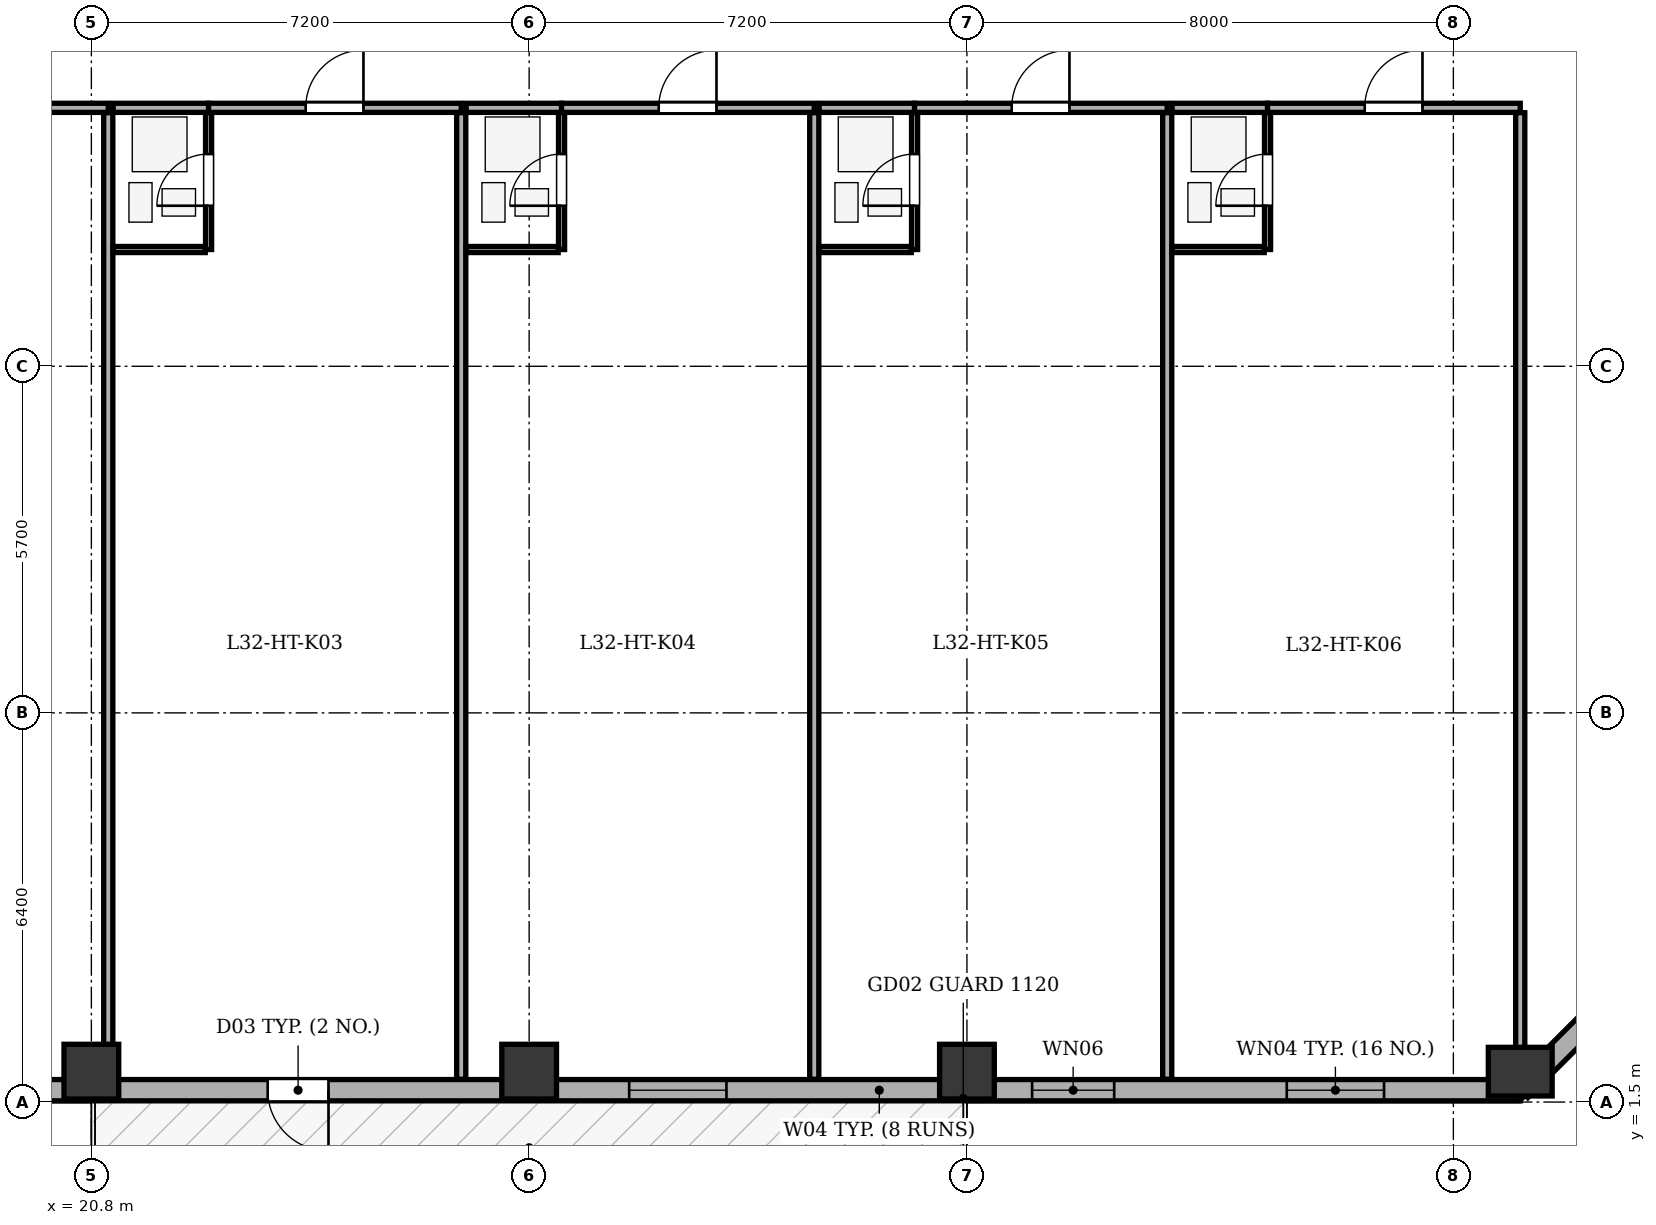
"""IFC4 building model, lengths in metres.
Left out: names, types, materials, properties, quantities, classifications, styles, units other than length and angle.
Written with IfcOpenShell. Run it as: python <this file> out.ifc"""

import sys

from ifc_helpers import new_model, si_unit, direction, frame, frame_2d, origin, origin_2d, place, context, subcontext, project, spatial, rectangle, extrude, element, fill, save


model = new_model("IFC4")
c1 = context("Model", 3, precision=1e-05, world=origin(), true_north=direction((0.0, 1.0)))
c2 = subcontext(c1, "Body", "Model", "MODEL_VIEW")
j1 = project(units=[si_unit("LENGTHUNIT", "METRE"), si_unit("PLANEANGLEUNIT", "RADIAN")], contexts=[c1])
p1 = place(None, origin())
s1 = spatial("IfcSite", under=j1, at=p1, CompositionType="ELEMENT")
p2 = place(p1, origin())
s2 = spatial("IfcBuilding", under=s1, at=p2, CompositionType="ELEMENT")
p3 = place(p2, frame((0.0, 0.0, 130.8)))
s3 = spatial("IfcBuildingStorey", under=s2, at=p3, CompositionType="ELEMENT", Elevation=130.8)
for number, where, z_axis, x_axis in (
    (1, (20.8, 2.0, 0.0), (0.0, 0.0, 1.0), (1.0, 0.0, 0.0)),
    (2, (28.0, 2.0, 0.0), (0.0, 0.0, 1.0), (1.0, 0.0, 0.0)),
    (3, (35.2, 2.0, 0.0), (0.0, 0.0, 1.0), (1.0, 0.0, 0.0)),
):
    element("IfcColumn", number, at=place(p3, frame(where, z_axis=z_axis, x_axis=x_axis)), inside=s3, PredefinedType="COLUMN", context=c2, shape_type="SweptSolid", body=[
        extrude(rectangle(XDim=0.9, YDim=0.9, at=origin_2d()), origin(), (0.0, 0.0, 1.0), 3.5),
    ])
p4 = place(p3, frame((44.3, 2.0, 0.0), z_axis=(0.0, 0.0, 1.0), x_axis=(1.0, 0.0, 0.0)))
e4 = element("IfcColumn", 4, at=p4, inside=s3, PredefinedType="COLUMN", context=c2, shape_type="SweptSolid", body=[
    extrude(rectangle(XDim=0.8, YDim=1.05, at=origin_2d()), origin(), (0.0, 0.0, 1.0), 3.5),
])
p5 = place(p3, frame((44.3, 1.695, 0.0), z_axis=(0.0, 0.0, 1.0), x_axis=(-1.0, 0.0, 0.0)))
e5 = element("IfcWall", 5, at=p5, inside=s3, PredefinedType="STANDARD", context=c2, shape_type="SweptSolid", body=[
    extrude(rectangle(XDim=35.0, YDim=0.35, at=frame_2d((17.5, 0.0))), origin(), (0.0, 0.0, 1.0), 2.785),
])
p6 = place(p5, frame((19.6, 0.0, 0.0)))
e6 = element("IfcOpeningElement", 6, at=p6, cuts=e5, PredefinedType="OPENING", context=c2, shape_type="SweptSolid", body=[
    extrude(rectangle(XDim=1.0, YDim=2.02, at=frame_2d((0.5, 1.01))), frame((0.0, 0.185, 0.0), z_axis=(0.0, -1.0, 0.0), x_axis=(1.0, 0.0, 0.0)), (0.0, 0.0, 1.0), 0.37),
])
p7 = place(p5, frame((2.24, 0.0, 0.75)))
e7 = element("IfcOpeningElement", 7, at=p7, cuts=e5, PredefinedType="OPENING", context=c2, shape_type="SweptSolid", body=[
    extrude(rectangle(XDim=1.6, YDim=1.75, at=frame_2d((0.8, 0.875))), frame((0.0, 0.185, 0.0), z_axis=(0.0, -1.0, 0.0), x_axis=(1.0, 0.0, 0.0)), (0.0, 0.0, 1.0), 0.37),
])
p8 = place(p5, frame((6.678, 0.0, 0.75)))
e8 = element("IfcOpeningElement", 8, at=p8, cuts=e5, PredefinedType="OPENING", context=c2, shape_type="SweptSolid", body=[
    extrude(rectangle(XDim=1.35, YDim=1.75, at=frame_2d((0.675, 0.875))), frame((0.0, 0.185, 0.0), z_axis=(0.0, -1.0, 0.0), x_axis=(1.0, 0.0, 0.0)), (0.0, 0.0, 1.0), 0.37),
])
p9 = place(p5, frame((13.055, 0.0, 0.75)))
e9 = element("IfcOpeningElement", 9, at=p9, cuts=e5, PredefinedType="OPENING", context=c2, shape_type="SweptSolid", body=[
    extrude(rectangle(XDim=1.6, YDim=1.75, at=frame_2d((0.8, 0.875))), frame((0.0, 0.185, 0.0), z_axis=(0.0, -1.0, 0.0), x_axis=(1.0, 0.0, 0.0)), (0.0, 0.0, 1.0), 0.37),
])
p10 = place(p5, frame((25.393, 0.0, 0.75)))
e10 = element("IfcOpeningElement", 10, at=p10, cuts=e5, PredefinedType="OPENING", context=c2, shape_type="SweptSolid", body=[
    extrude(rectangle(XDim=1.6, YDim=1.75, at=frame_2d((0.8, 0.875))), frame((0.0, 0.185, 0.0), z_axis=(0.0, -1.0, 0.0), x_axis=(1.0, 0.0, 0.0)), (0.0, 0.0, 1.0), 0.37),
])
p11 = place(p5, frame((30.618, 0.0, 0.75)))
e11 = element("IfcOpeningElement", 11, at=p11, cuts=e5, PredefinedType="OPENING", context=c2, shape_type="SweptSolid", body=[
    extrude(rectangle(XDim=1.6, YDim=1.75, at=frame_2d((0.8, 0.875))), frame((0.0, 0.185, 0.0), z_axis=(0.0, -1.0, 0.0), x_axis=(1.0, 0.0, 0.0)), (0.0, 0.0, 1.0), 0.37),
])
p12 = place(p3, frame((49.105, 6.5, 0.0), z_axis=(0.0, 0.0, 1.0), x_axis=(-0.707106781187, -0.707106781187, 0.0)))
e12 = element("IfcWall", 12, at=p12, inside=s3, PredefinedType="STANDARD", context=c2, shape_type="SweptSolid", body=[
    extrude(rectangle(XDim=6.795, YDim=0.35, at=frame_2d((3.397, 0.0))), origin(), (0.0, 0.0, 1.0), 2.785),
])
p13 = place(p12, frame((2.698, 0.0, 0.75)))
e13 = element("IfcOpeningElement", 13, at=p13, cuts=e12, PredefinedType="OPENING", context=c2, shape_type="SweptSolid", body=[
    extrude(rectangle(XDim=1.4, YDim=1.65, at=frame_2d((0.7, 0.825))), frame((0.0, 0.185, 0.0), z_axis=(0.0, -1.0, 0.0), x_axis=(1.0, 0.0, 0.0)), (0.0, 0.0, 1.0), 0.37),
])
p14 = place(p3, frame((17.264, 17.85, 0.0), z_axis=(0.0, 0.0, 1.0), x_axis=(1.0, 0.0, 0.0)))
e14 = element("IfcWall", 14, at=p14, inside=s3, PredefinedType="PARTITIONING", context=c2, shape_type="SweptSolid", body=[
    extrude(rectangle(XDim=3.814, YDim=0.15, at=frame_2d((1.907, 0.0))), origin(), (0.0, 0.0, 1.0), 3.2),
])
p15 = place(p14, frame((1.427, 0.0, 0.0)))
e15 = element("IfcOpeningElement", 15, at=p15, cuts=e14, PredefinedType="OPENING", context=c2, shape_type="SweptSolid", body=[
    extrude(rectangle(XDim=0.95, YDim=2.1, at=frame_2d((0.475, 1.05))), frame((0.0, 0.085, 0.0), z_axis=(0.0, -1.0, 0.0), x_axis=(1.0, 0.0, 0.0)), (0.0, 0.0, 1.0), 0.17),
])
p16 = place(p3, frame((21.078, 1.875, 0.0), z_axis=(0.0, 0.0, 1.0), x_axis=(0.0, 1.0, 0.0)))
e16 = element("IfcWall", 16, at=p16, inside=s3, PredefinedType="PARTITIONING", context=c2, shape_type="SweptSolid", body=[
    extrude(rectangle(XDim=15.895, YDim=0.15, at=frame_2d((7.948, 0.0))), origin(), (0.0, 0.0, 1.0), 2.535),
])
p17 = place(p3, frame((21.158, 17.85, 0.0), z_axis=(0.0, 0.0, 1.0), x_axis=(1.0, 0.0, 0.0)))
e17 = element("IfcWall", 17, at=p17, inside=s3, PredefinedType="PARTITIONING", context=c2, shape_type="SweptSolid", body=[
    extrude(rectangle(XDim=1.57, YDim=0.15, at=frame_2d((0.785, 0.0))), origin(), (0.0, 0.0, 1.0), 3.2),
])
p18 = place(p3, frame((22.728, 17.85, 0.0), z_axis=(0.0, 0.0, 1.0), x_axis=(1.0, 0.0, 0.0)))
e18 = element("IfcWall", 18, at=p18, inside=s3, PredefinedType="PARTITIONING", context=c2, shape_type="SweptSolid", body=[
    extrude(rectangle(XDim=4.155, YDim=0.15, at=frame_2d((2.078, 0.0))), origin(), (0.0, 0.0, 1.0), 3.2),
])
p19 = place(p18, frame((1.597, 0.0, 0.0)))
e19 = element("IfcOpeningElement", 19, at=p19, cuts=e18, PredefinedType="OPENING", context=c2, shape_type="SweptSolid", body=[
    extrude(rectangle(XDim=0.95, YDim=2.1, at=frame_2d((0.475, 1.05))), frame((0.0, 0.085, 0.0), z_axis=(0.0, -1.0, 0.0), x_axis=(1.0, 0.0, 0.0)), (0.0, 0.0, 1.0), 0.17),
])
p20 = place(p3, frame((22.728, 15.52, 0.0), z_axis=(0.0, 0.0, 1.0), x_axis=(0.0, 1.0, 0.0)))
e20 = element("IfcWall", 20, at=p20, inside=s3, PredefinedType="PARTITIONING", context=c2, shape_type="SweptSolid", body=[
    extrude(rectangle(XDim=2.25, YDim=0.1, at=frame_2d((1.125, 0.0))), origin(), (0.0, 0.0, 1.0), 3.2),
])
p21 = place(p20, frame((0.72, 0.0, 0.0)))
e21 = element("IfcOpeningElement", 21, at=p21, cuts=e20, PredefinedType="OPENING", context=c2, shape_type="SweptSolid", body=[
    extrude(rectangle(XDim=0.85, YDim=2.05, at=frame_2d((0.425, 1.025))), frame((0.0, 0.06, 0.0), z_axis=(0.0, -1.0, 0.0), x_axis=(1.0, 0.0, 0.0)), (0.0, 0.0, 1.0), 0.12),
])
p22 = place(p3, frame((21.158, 15.52, 0.0), z_axis=(0.0, 0.0, 1.0), x_axis=(1.0, 0.0, 0.0)))
e22 = element("IfcWall", 22, at=p22, inside=s3, PredefinedType="PARTITIONING", context=c2, shape_type="SweptSolid", body=[
    extrude(rectangle(XDim=1.515, YDim=0.1, at=frame_2d((0.758, 0.0))), origin(), (0.0, 0.0, 1.0), 3.2),
])
p23 = place(p3, frame((26.883, 1.875, 0.0), z_axis=(0.0, 0.0, 1.0), x_axis=(0.0, 1.0, 0.0)))
e23 = element("IfcWall", 23, at=p23, inside=s3, PredefinedType="PARTITIONING", context=c2, shape_type="SweptSolid", body=[
    extrude(rectangle(XDim=15.895, YDim=0.15, at=frame_2d((7.948, 0.0))), origin(), (0.0, 0.0, 1.0), 3.2),
])
p24 = place(p3, frame((26.963, 17.85, 0.0), z_axis=(0.0, 0.0, 1.0), x_axis=(1.0, 0.0, 0.0)))
e24 = element("IfcWall", 24, at=p24, inside=s3, PredefinedType="PARTITIONING", context=c2, shape_type="SweptSolid", body=[
    extrude(rectangle(XDim=1.57, YDim=0.15, at=frame_2d((0.785, 0.0))), origin(), (0.0, 0.0, 1.0), 3.2),
])
p25 = place(p3, frame((28.533, 17.85, 0.0), z_axis=(0.0, 0.0, 1.0), x_axis=(1.0, 0.0, 0.0)))
e25 = element("IfcWall", 25, at=p25, inside=s3, PredefinedType="PARTITIONING", context=c2, shape_type="SweptSolid", body=[
    extrude(rectangle(XDim=4.156, YDim=0.15, at=frame_2d((2.078, 0.0))), origin(), (0.0, 0.0, 1.0), 3.2),
])
p26 = place(p25, frame((1.598, 0.0, 0.0)))
e26 = element("IfcOpeningElement", 26, at=p26, cuts=e25, PredefinedType="OPENING", context=c2, shape_type="SweptSolid", body=[
    extrude(rectangle(XDim=0.95, YDim=2.1, at=frame_2d((0.475, 1.05))), frame((0.0, 0.085, 0.0), z_axis=(0.0, -1.0, 0.0), x_axis=(1.0, 0.0, 0.0)), (0.0, 0.0, 1.0), 0.17),
])
p27 = place(p3, frame((28.533, 15.52, 0.0), z_axis=(0.0, 0.0, 1.0), x_axis=(0.0, 1.0, 0.0)))
e27 = element("IfcWall", 27, at=p27, inside=s3, PredefinedType="PARTITIONING", context=c2, shape_type="SweptSolid", body=[
    extrude(rectangle(XDim=2.25, YDim=0.1, at=frame_2d((1.125, 0.0))), origin(), (0.0, 0.0, 1.0), 3.2),
])
p28 = place(p27, frame((0.72, 0.0, 0.0)))
e28 = element("IfcOpeningElement", 28, at=p28, cuts=e27, PredefinedType="OPENING", context=c2, shape_type="SweptSolid", body=[
    extrude(rectangle(XDim=0.85, YDim=2.05, at=frame_2d((0.425, 1.025))), frame((0.0, 0.06, 0.0), z_axis=(0.0, -1.0, 0.0), x_axis=(1.0, 0.0, 0.0)), (0.0, 0.0, 1.0), 0.12),
])
p29 = place(p3, frame((26.963, 15.52, 0.0), z_axis=(0.0, 0.0, 1.0), x_axis=(1.0, 0.0, 0.0)))
e29 = element("IfcWall", 29, at=p29, inside=s3, PredefinedType="PARTITIONING", context=c2, shape_type="SweptSolid", body=[
    extrude(rectangle(XDim=1.515, YDim=0.1, at=frame_2d((0.758, 0.0))), origin(), (0.0, 0.0, 1.0), 3.2),
])
p30 = place(p3, frame((32.689, 1.875, 0.0), z_axis=(0.0, 0.0, 1.0), x_axis=(0.0, 1.0, 0.0)))
e30 = element("IfcWall", 30, at=p30, inside=s3, PredefinedType="PARTITIONING", context=c2, shape_type="SweptSolid", body=[
    extrude(rectangle(XDim=15.895, YDim=0.15, at=frame_2d((7.948, 0.0))), origin(), (0.0, 0.0, 1.0), 3.2),
])
p31 = place(p3, frame((32.769, 17.85, 0.0), z_axis=(0.0, 0.0, 1.0), x_axis=(1.0, 0.0, 0.0)))
e31 = element("IfcWall", 31, at=p31, inside=s3, PredefinedType="PARTITIONING", context=c2, shape_type="SweptSolid", body=[
    extrude(rectangle(XDim=1.57, YDim=0.15, at=frame_2d((0.785, 0.0))), origin(), (0.0, 0.0, 1.0), 3.2),
])
p32 = place(p3, frame((34.339, 17.85, 0.0), z_axis=(0.0, 0.0, 1.0), x_axis=(1.0, 0.0, 0.0)))
e32 = element("IfcWall", 32, at=p32, inside=s3, PredefinedType="PARTITIONING", context=c2, shape_type="SweptSolid", body=[
    extrude(rectangle(XDim=4.155, YDim=0.15, at=frame_2d((2.077, 0.0))), origin(), (0.0, 0.0, 1.0), 3.2),
])
p33 = place(p32, frame((1.597, 0.0, 0.0)))
e33 = element("IfcOpeningElement", 33, at=p33, cuts=e32, PredefinedType="OPENING", context=c2, shape_type="SweptSolid", body=[
    extrude(rectangle(XDim=0.95, YDim=2.1, at=frame_2d((0.475, 1.05))), frame((0.0, 0.085, 0.0), z_axis=(0.0, -1.0, 0.0), x_axis=(1.0, 0.0, 0.0)), (0.0, 0.0, 1.0), 0.17),
])
p34 = place(p3, frame((34.339, 15.52, 0.0), z_axis=(0.0, 0.0, 1.0), x_axis=(0.0, 1.0, 0.0)))
e34 = element("IfcWall", 34, at=p34, inside=s3, PredefinedType="PARTITIONING", context=c2, shape_type="SweptSolid", body=[
    extrude(rectangle(XDim=2.25, YDim=0.1, at=frame_2d((1.125, 0.0))), origin(), (0.0, 0.0, 1.0), 3.2),
])
p35 = place(p34, frame((0.72, 0.0, 0.0)))
e35 = element("IfcOpeningElement", 35, at=p35, cuts=e34, PredefinedType="OPENING", context=c2, shape_type="SweptSolid", body=[
    extrude(rectangle(XDim=0.85, YDim=2.05, at=frame_2d((0.425, 1.025))), frame((0.0, 0.06, 0.0), z_axis=(0.0, -1.0, 0.0), x_axis=(1.0, 0.0, 0.0)), (0.0, 0.0, 1.0), 0.12),
])
p36 = place(p3, frame((32.769, 15.52, 0.0), z_axis=(0.0, 0.0, 1.0), x_axis=(1.0, 0.0, 0.0)))
e36 = element("IfcWall", 36, at=p36, inside=s3, PredefinedType="PARTITIONING", context=c2, shape_type="SweptSolid", body=[
    extrude(rectangle(XDim=1.515, YDim=0.1, at=frame_2d((0.757, 0.0))), origin(), (0.0, 0.0, 1.0), 3.2),
])
p37 = place(p3, frame((38.494, 1.875, 0.0), z_axis=(0.0, 0.0, 1.0), x_axis=(0.0, 1.0, 0.0)))
e37 = element("IfcWall", 37, at=p37, inside=s3, PredefinedType="PARTITIONING", context=c2, shape_type="SweptSolid", body=[
    extrude(rectangle(XDim=15.895, YDim=0.15, at=frame_2d((7.948, 0.0))), origin(), (0.0, 0.0, 1.0), 3.2),
])
p38 = place(p3, frame((38.574, 17.85, 0.0), z_axis=(0.0, 0.0, 1.0), x_axis=(1.0, 0.0, 0.0)))
e38 = element("IfcWall", 38, at=p38, inside=s3, PredefinedType="PARTITIONING", context=c2, shape_type="SweptSolid", body=[
    extrude(rectangle(XDim=1.57, YDim=0.15, at=frame_2d((0.785, 0.0))), origin(), (0.0, 0.0, 1.0), 3.2),
])
p39 = place(p3, frame((40.144, 17.85, 0.0), z_axis=(0.0, 0.0, 1.0), x_axis=(1.0, 0.0, 0.0)))
e39 = element("IfcWall", 39, at=p39, inside=s3, PredefinedType="PARTITIONING", context=c2, shape_type="SweptSolid", body=[
    extrude(rectangle(XDim=4.156, YDim=0.15, at=frame_2d((2.078, 0.0))), origin(), (0.0, 0.0, 1.0), 3.2),
])
p40 = place(p39, frame((1.598, 0.0, 0.0)))
e40 = element("IfcOpeningElement", 40, at=p40, cuts=e39, PredefinedType="OPENING", context=c2, shape_type="SweptSolid", body=[
    extrude(rectangle(XDim=0.95, YDim=2.1, at=frame_2d((0.475, 1.05))), frame((0.0, 0.085, 0.0), z_axis=(0.0, -1.0, 0.0), x_axis=(1.0, 0.0, 0.0)), (0.0, 0.0, 1.0), 0.17),
])
p41 = place(p3, frame((40.144, 15.52, 0.0), z_axis=(0.0, 0.0, 1.0), x_axis=(0.0, 1.0, 0.0)))
e41 = element("IfcWall", 41, at=p41, inside=s3, PredefinedType="PARTITIONING", context=c2, shape_type="SweptSolid", body=[
    extrude(rectangle(XDim=2.25, YDim=0.1, at=frame_2d((1.125, 0.0))), origin(), (0.0, 0.0, 1.0), 3.2),
])
p42 = place(p41, frame((0.72, 0.0, 0.0)))
e42 = element("IfcOpeningElement", 42, at=p42, cuts=e41, PredefinedType="OPENING", context=c2, shape_type="SweptSolid", body=[
    extrude(rectangle(XDim=0.85, YDim=2.05, at=frame_2d((0.425, 1.025))), frame((0.0, 0.06, 0.0), z_axis=(0.0, -1.0, 0.0), x_axis=(1.0, 0.0, 0.0)), (0.0, 0.0, 1.0), 0.12),
])
p43 = place(p3, frame((38.574, 15.52, 0.0), z_axis=(0.0, 0.0, 1.0), x_axis=(1.0, 0.0, 0.0)))
e43 = element("IfcWall", 43, at=p43, inside=s3, PredefinedType="PARTITIONING", context=c2, shape_type="SweptSolid", body=[
    extrude(rectangle(XDim=1.515, YDim=0.1, at=frame_2d((0.758, 0.0))), origin(), (0.0, 0.0, 1.0), 3.2),
])
p44 = place(p3, frame((44.3, 1.875, 0.0), z_axis=(0.0, 0.0, 1.0), x_axis=(0.0, 1.0, 0.0)))
e44 = element("IfcWall", 44, at=p44, inside=s3, PredefinedType="PARTITIONING", context=c2, shape_type="SweptSolid", body=[
    extrude(rectangle(XDim=15.895, YDim=0.15, at=frame_2d((7.948, 0.0))), origin(), (0.0, 0.0, 1.0), 3.2),
])
p45 = place(p6, origin())
e45 = element("IfcDoor", 45, at=p45, inside=s3, OperationType="SINGLE_SWING_LEFT", PredefinedType="DOOR", context=c2, shape_type="SweptSolid", body=[
    extrude(rectangle(XDim=1.0, YDim=2.02, at=frame_2d((0.5, 1.01))), frame((0.0, 0.025, 0.0), z_axis=(0.0, -1.0, 0.0), x_axis=(1.0, 0.0, 0.0)), (0.0, 0.0, 1.0), 0.05),
])
fill(e6, e45)
p46 = place(p7, origin())
e46 = element("IfcWindow", 46, at=p46, inside=s3, PartitioningType="SINGLE_PANEL", PredefinedType="WINDOW", context=c2, shape_type="SweptSolid", body=[
    extrude(rectangle(XDim=1.6, YDim=1.75, at=frame_2d((0.8, 0.875))), frame((0.0, -0.01, 0.0), z_axis=(0.0, -1.0, 0.0), x_axis=(1.0, 0.0, 0.0)), (0.0, 0.0, 1.0), 0.06),
])
fill(e7, e46)
p47 = place(p8, origin())
e47 = element("IfcWindow", 47, at=p47, inside=s3, PartitioningType="SINGLE_PANEL", PredefinedType="WINDOW", context=c2, shape_type="SweptSolid", body=[
    extrude(rectangle(XDim=1.35, YDim=1.75, at=frame_2d((0.675, 0.875))), frame((0.0, -0.01, 0.0), z_axis=(0.0, -1.0, 0.0), x_axis=(1.0, 0.0, 0.0)), (0.0, 0.0, 1.0), 0.06),
])
fill(e8, e47)
p48 = place(p9, origin())
e48 = element("IfcWindow", 48, at=p48, inside=s3, PartitioningType="SINGLE_PANEL", PredefinedType="WINDOW", context=c2, shape_type="SweptSolid", body=[
    extrude(rectangle(XDim=1.6, YDim=1.75, at=frame_2d((0.8, 0.875))), frame((0.0, -0.01, 0.0), z_axis=(0.0, -1.0, 0.0), x_axis=(1.0, 0.0, 0.0)), (0.0, 0.0, 1.0), 0.06),
])
fill(e9, e48)
p49 = place(p21, origin())
e49 = element("IfcDoor", 49, at=p49, inside=s3, OperationType="SINGLE_SWING_LEFT", PredefinedType="DOOR", context=c2, shape_type="SweptSolid", body=[
    extrude(rectangle(XDim=0.85, YDim=2.05, at=frame_2d((0.425, 1.025))), frame((0.0, 0.025, 0.0), z_axis=(0.0, -1.0, 0.0), x_axis=(1.0, 0.0, 0.0)), (0.0, 0.0, 1.0), 0.05),
])
fill(e21, e49)
p50 = place(p19, origin())
e50 = element("IfcDoor", 50, at=p50, inside=s3, OperationType="SINGLE_SWING_RIGHT", PredefinedType="DOOR", context=c2, shape_type="SweptSolid", body=[
    extrude(rectangle(XDim=0.95, YDim=2.1, at=frame_2d((0.475, 1.05))), frame((0.0, 0.025, 0.0), z_axis=(0.0, -1.0, 0.0), x_axis=(1.0, 0.0, 0.0)), (0.0, 0.0, 1.0), 0.05),
])
fill(e19, e50)
p51 = place(p28, origin())
e51 = element("IfcDoor", 51, at=p51, inside=s3, OperationType="SINGLE_SWING_LEFT", PredefinedType="DOOR", context=c2, shape_type="SweptSolid", body=[
    extrude(rectangle(XDim=0.85, YDim=2.05, at=frame_2d((0.425, 1.025))), frame((0.0, 0.025, 0.0), z_axis=(0.0, -1.0, 0.0), x_axis=(1.0, 0.0, 0.0)), (0.0, 0.0, 1.0), 0.05),
])
fill(e28, e51)
p52 = place(p26, origin())
e52 = element("IfcDoor", 52, at=p52, inside=s3, OperationType="SINGLE_SWING_RIGHT", PredefinedType="DOOR", context=c2, shape_type="SweptSolid", body=[
    extrude(rectangle(XDim=0.95, YDim=2.1, at=frame_2d((0.475, 1.05))), frame((0.0, 0.025, 0.0), z_axis=(0.0, -1.0, 0.0), x_axis=(1.0, 0.0, 0.0)), (0.0, 0.0, 1.0), 0.05),
])
fill(e26, e52)
p53 = place(p35, origin())
e53 = element("IfcDoor", 53, at=p53, inside=s3, OperationType="SINGLE_SWING_LEFT", PredefinedType="DOOR", context=c2, shape_type="SweptSolid", body=[
    extrude(rectangle(XDim=0.85, YDim=2.05, at=frame_2d((0.425, 1.025))), frame((0.0, 0.025, 0.0), z_axis=(0.0, -1.0, 0.0), x_axis=(1.0, 0.0, 0.0)), (0.0, 0.0, 1.0), 0.05),
])
fill(e35, e53)
p54 = place(p33, origin())
e54 = element("IfcDoor", 54, at=p54, inside=s3, OperationType="SINGLE_SWING_RIGHT", PredefinedType="DOOR", context=c2, shape_type="SweptSolid", body=[
    extrude(rectangle(XDim=0.95, YDim=2.1, at=frame_2d((0.475, 1.05))), frame((0.0, 0.025, 0.0), z_axis=(0.0, -1.0, 0.0), x_axis=(1.0, 0.0, 0.0)), (0.0, 0.0, 1.0), 0.05),
])
fill(e33, e54)
p55 = place(p42, origin())
e55 = element("IfcDoor", 55, at=p55, inside=s3, OperationType="SINGLE_SWING_LEFT", PredefinedType="DOOR", context=c2, shape_type="SweptSolid", body=[
    extrude(rectangle(XDim=0.85, YDim=2.05, at=frame_2d((0.425, 1.025))), frame((0.0, 0.025, 0.0), z_axis=(0.0, -1.0, 0.0), x_axis=(1.0, 0.0, 0.0)), (0.0, 0.0, 1.0), 0.05),
])
fill(e42, e55)
p56 = place(p40, origin())
e56 = element("IfcDoor", 56, at=p56, inside=s3, OperationType="SINGLE_SWING_RIGHT", PredefinedType="DOOR", context=c2, shape_type="SweptSolid", body=[
    extrude(rectangle(XDim=0.95, YDim=2.1, at=frame_2d((0.475, 1.05))), frame((0.0, 0.025, 0.0), z_axis=(0.0, -1.0, 0.0), x_axis=(1.0, 0.0, 0.0)), (0.0, 0.0, 1.0), 0.05),
])
fill(e40, e56)
save(model, sys.argv[1])
